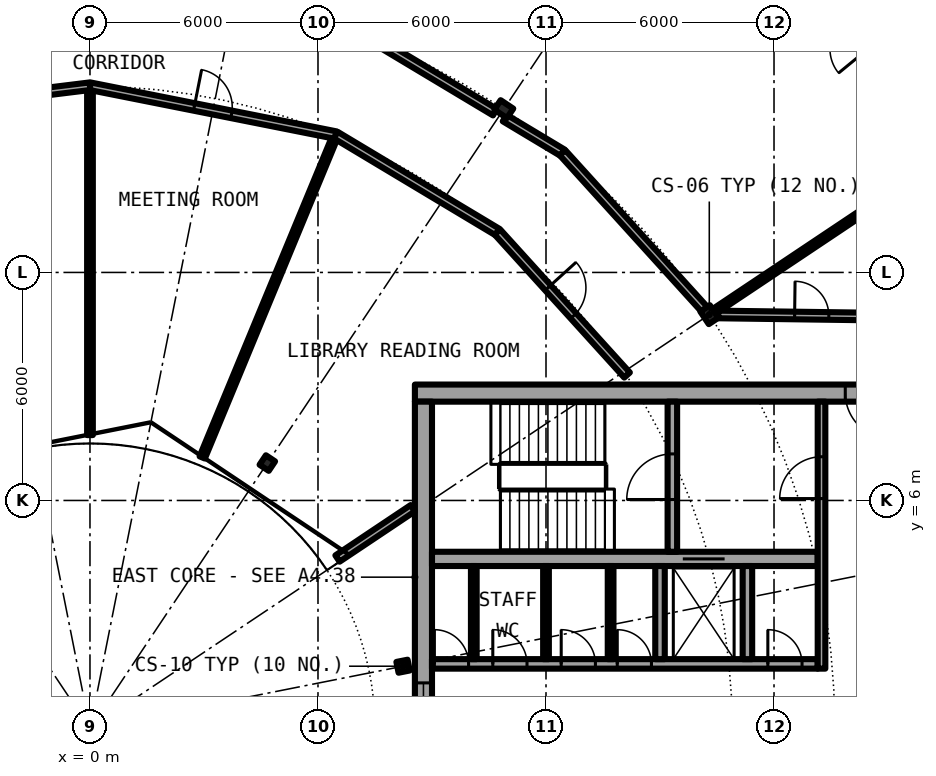
"""IFC4 building model, lengths in metres.
Left out: names, types, materials, properties, quantities, classifications, styles, units other than length and angle.
Written with IfcOpenShell. Run it as: python <this file> out.ifc"""

import sys

from ifc_helpers import new_model, si_unit, direction, frame, frame_2d, origin, origin_2d, place, context, subcontext, project, spatial, rectangle, i_section, extrude, element, fill, save


model = new_model("IFC4")
c1 = context("Model", 3, precision=1e-05, world=origin(), true_north=direction((0.0, 1.0)))
c2 = subcontext(c1, "Body", "Model", "MODEL_VIEW")
j1 = project(units=[si_unit("LENGTHUNIT", "METRE"), si_unit("PLANEANGLEUNIT", "RADIAN")], contexts=[c1])
p1 = place(None, origin())
s1 = spatial("IfcSite", under=j1, at=p1, CompositionType="ELEMENT")
p2 = place(p1, origin())
s2 = spatial("IfcBuilding", under=s1, at=p2, CompositionType="ELEMENT")
p3 = place(p2, frame((0.0, 0.0, 208.5)))
s3 = spatial("IfcBuildingStorey", under=s2, at=p3, CompositionType="ELEMENT", Elevation=208.5)
for number, where, z_axis, x_axis in (
    (1, (16.297, 10.889, 0.0), (0.0, 0.0, 1.0), (0.831, 0.556, 0.0)),
    (2, (10.889, 16.297, 0.0), (0.0, 0.0, 1.0), (0.556, 0.831, 0.0)),
):
    element("IfcColumn", number, at=place(p3, frame(where, z_axis=z_axis, x_axis=x_axis)), inside=s3, PredefinedType="COLUMN", context=c2, shape_type="SweptSolid", body=[
        extrude(i_section(OverallWidth=0.3, OverallDepth=0.4, WebThickness=0.013, FlangeThickness=0.024, FilletRadius=0.027, at=origin_2d()), origin(), (0.0, 0.0, 1.0), 4.2),
    ])
for number, where, z_axis, x_axis in (
    (3, (8.239, 1.639, 0.0), (0.0, 0.0, 1.0), (0.981, 0.195, 0.0)),
    (4, (4.667, 6.984, 0.0), (0.0, 0.0, 1.0), (0.556, 0.831, 0.0)),
):
    element("IfcColumn", number, at=place(p3, frame(where, z_axis=z_axis, x_axis=x_axis)), inside=s3, PredefinedType="COLUMN", context=c2, shape_type="SweptSolid", body=[
        extrude(i_section(OverallWidth=0.3, OverallDepth=0.29, WebThickness=0.009, FlangeThickness=0.014, FilletRadius=0.027, at=origin_2d()), origin(), (0.0, 0.0, 1.0), 4.2),
    ])
p4 = place(p3, frame((22.699, 15.167, 0.0), z_axis=(0.0, 0.0, 1.0), x_axis=(-0.634382322723, 0.773019449054, 0.0)))
e5 = element("IfcWall", 5, at=p4, inside=s3, PredefinedType="SOLIDWALL", context=c2, shape_type="SweptSolid", body=[
    extrude(rectangle(XDim=5.352, YDim=0.25, at=frame_2d((2.676, 0.0))), origin(), (0.0, 0.0, 1.0), 3.85),
])
p5 = place(p4, frame((0.841, 0.0, 0.0)))
e6 = element("IfcOpeningElement", 6, at=p5, cuts=e5, PredefinedType="OPENING", context=c2, shape_type="SweptSolid", body=[
    extrude(rectangle(XDim=1.0, YDim=2.2, at=frame_2d((0.5, 1.1))), frame((0.0, 0.135, 0.0), z_axis=(0.0, -1.0, 0.0), x_axis=(1.0, 0.0, 0.0)), (0.0, 0.0, 1.0), 0.27),
])
p6 = place(p4, frame((3.51, 0.0, 0.0)))
e7 = element("IfcOpeningElement", 7, at=p6, cuts=e5, PredefinedType="OPENING", context=c2, shape_type="SweptSolid", body=[
    extrude(rectangle(XDim=1.0, YDim=2.2, at=frame_2d((0.5, 1.1))), frame((0.0, 0.135, 0.0), z_axis=(0.0, -1.0, 0.0), x_axis=(1.0, 0.0, 0.0)), (0.0, 0.0, 1.0), 0.27),
])
p7 = place(p3, frame((22.05, 8.825, 0.0), z_axis=(0.0, 0.0, 1.0), x_axis=(-1.0, 0.0, 0.0)))
e8 = element("IfcWall", 8, at=p7, inside=s3, PredefinedType="SHEAR", context=c2, shape_type="SweptSolid", body=[
    extrude(rectangle(XDim=13.5, YDim=0.45, at=frame_2d((6.75, 0.0))), origin(), (0.0, 0.0, 1.0), 4.2),
])
p8 = place(p7, frame((0.975, 0.0, 0.0)))
e9 = element("IfcOpeningElement", 9, at=p8, cuts=e8, PredefinedType="OPENING", context=c2, shape_type="SweptSolid", body=[
    extrude(rectangle(XDim=1.2, YDim=2.3, at=frame_2d((0.6, 1.15))), frame((0.0, 0.235, 0.0), z_axis=(0.0, -1.0, 0.0), x_axis=(1.0, 0.0, 0.0)), (0.0, 0.0, 1.0), 0.47),
])
p9 = place(p3, frame((8.775, -8.6, 0.0), z_axis=(0.0, 0.0, 1.0), x_axis=(0.0, 1.0, 0.0)))
e10 = element("IfcWall", 10, at=p9, inside=s3, PredefinedType="SHEAR", context=c2, shape_type="SweptSolid", body=[
    extrude(rectangle(XDim=17.2, YDim=0.45, at=frame_2d((8.6, 0.0))), origin(), (0.0, 0.0, 1.0), 4.2),
])
p10 = place(p9, frame((7.4, 0.0, 0.1)))
e11 = element("IfcOpeningElement", 11, at=p10, cuts=e10, PredefinedType="OPENING", context=c2, shape_type="SweptSolid", body=[
    extrude(rectangle(XDim=2.4, YDim=2.2, at=frame_2d((1.2, 1.1))), frame((0.0, 0.235, 0.0), z_axis=(0.0, -1.0, 0.0), x_axis=(1.0, 0.0, 0.0)), (0.0, 0.0, 1.0), 0.47),
])
p11 = place(p3, frame((9.0, 1.7, 0.0), z_axis=(0.0, 0.0, 1.0), x_axis=(1.0, 0.0, 0.0)))
e12 = element("IfcWall", 12, at=p11, inside=s3, PredefinedType="SHEAR", context=c2, shape_type="SweptSolid", body=[
    extrude(rectangle(XDim=10.15, YDim=0.25, at=frame_2d((5.075, 0.0))), origin(), (0.0, 0.0, 1.0), 4.2),
])
p12 = place(p11, frame((0.062, 0.0, 0.0)))
e13 = element("IfcOpeningElement", 13, at=p12, cuts=e12, PredefinedType="OPENING", context=c2, shape_type="SweptSolid", body=[
    extrude(rectangle(XDim=0.9, YDim=2.3, at=frame_2d((0.45, 1.15))), frame((0.0, 0.135, 0.0), z_axis=(0.0, -1.0, 0.0), x_axis=(1.0, 0.0, 0.0)), (0.0, 0.0, 1.0), 0.27),
])
p13 = place(p11, frame((1.6, 0.0, 0.0)))
e14 = element("IfcOpeningElement", 14, at=p13, cuts=e12, PredefinedType="OPENING", context=c2, shape_type="SweptSolid", body=[
    extrude(rectangle(XDim=0.9, YDim=2.3, at=frame_2d((0.45, 1.15))), frame((0.0, 0.135, 0.0), z_axis=(0.0, -1.0, 0.0), x_axis=(1.0, 0.0, 0.0)), (0.0, 0.0, 1.0), 0.27),
])
p14 = place(p11, frame((3.4, 0.0, 0.0)))
e15 = element("IfcOpeningElement", 15, at=p14, cuts=e12, PredefinedType="OPENING", context=c2, shape_type="SweptSolid", body=[
    extrude(rectangle(XDim=0.9, YDim=2.3, at=frame_2d((0.45, 1.15))), frame((0.0, 0.135, 0.0), z_axis=(0.0, -1.0, 0.0), x_axis=(1.0, 0.0, 0.0)), (0.0, 0.0, 1.0), 0.27),
])
p15 = place(p11, frame((4.875, 0.0, 0.0)))
e16 = element("IfcOpeningElement", 16, at=p15, cuts=e12, PredefinedType="OPENING", context=c2, shape_type="SweptSolid", body=[
    extrude(rectangle(XDim=0.9, YDim=2.3, at=frame_2d((0.45, 1.15))), frame((0.0, 0.135, 0.0), z_axis=(0.0, -1.0, 0.0), x_axis=(1.0, 0.0, 0.0)), (0.0, 0.0, 1.0), 0.27),
])
p16 = place(p11, frame((8.837, 0.0, 0.0)))
e17 = element("IfcOpeningElement", 17, at=p16, cuts=e12, PredefinedType="OPENING", context=c2, shape_type="SweptSolid", body=[
    extrude(rectangle(XDim=0.9, YDim=2.3, at=frame_2d((0.45, 1.15))), frame((0.0, 0.135, 0.0), z_axis=(0.0, -1.0, 0.0), x_axis=(1.0, 0.0, 0.0)), (0.0, 0.0, 1.0), 0.27),
])
p17 = place(p3, frame((9.0, 4.462, 0.0), z_axis=(0.0, 0.0, 1.0), x_axis=(1.0, 0.0, 0.0)))
e18 = element("IfcWall", 18, at=p17, inside=s3, PredefinedType="SHEAR", context=c2, shape_type="SweptSolid", body=[
    extrude(rectangle(XDim=10.15, YDim=0.375, at=frame_2d((5.075, 0.0))), origin(), (0.0, 0.0, 1.0), 4.2),
])
p18 = place(p17, frame((6.6, 0.0, 0.0)))
e19 = element("IfcOpeningElement", 19, at=p18, cuts=e18, PredefinedType="OPENING", context=c2, shape_type="SweptSolid", body=[
    extrude(rectangle(XDim=1.1, YDim=2.3, at=frame_2d((0.55, 1.15))), frame((0.0, 0.198, 0.0), z_axis=(0.0, -1.0, 0.0), x_axis=(1.0, 0.0, 0.0)), (0.0, 0.0, 1.0), 0.395),
])
p19 = place(p3, frame((15.325, 4.65, 0.0), z_axis=(0.0, 0.0, 1.0), x_axis=(0.0, 1.0, 0.0)))
e20 = element("IfcWall", 20, at=p19, inside=s3, PredefinedType="SHEAR", context=c2, shape_type="SweptSolid", body=[
    extrude(rectangle(XDim=3.95, YDim=0.25, at=frame_2d((1.975, 0.0))), origin(), (0.0, 0.0, 1.0), 4.2),
])
p20 = place(p19, frame((1.375, 0.0, 0.0)))
e21 = element("IfcOpeningElement", 21, at=p20, cuts=e20, PredefinedType="OPENING", context=c2, shape_type="SweptSolid", body=[
    extrude(rectangle(XDim=1.2, YDim=2.3, at=frame_2d((0.6, 1.15))), frame((0.0, 0.135, 0.0), z_axis=(0.0, -1.0, 0.0), x_axis=(1.0, 0.0, 0.0)), (0.0, 0.0, 1.0), 0.27),
])
for number, where, z_axis, x_axis in (
    (22, (15.0, 1.825, 0.0), (0.0, 0.0, 1.0), (0.0, 1.0, 0.0)),
    (23, (17.3, 1.825, 0.0), (0.0, 0.0, 1.0), (0.0, 1.0, 0.0)),
):
    element("IfcWall", number, at=place(p3, frame(where, z_axis=z_axis, x_axis=x_axis)), inside=s3, PredefinedType="SOLIDWALL", context=c2, shape_type="SweptSolid", body=[
        extrude(rectangle(XDim=2.45, YDim=0.25, at=frame_2d((1.225, 0.0))), origin(), (0.0, 0.0, 1.0), 3.85),
    ])
p21 = place(p3, frame((19.25, 1.575, 0.0), z_axis=(0.0, 0.0, 1.0), x_axis=(0.0, 1.0, 0.0)))
e24 = element("IfcWall", 24, at=p21, inside=s3, PredefinedType="SOLIDWALL", context=c2, shape_type="SweptSolid", body=[
    extrude(rectangle(XDim=7.025, YDim=0.2, at=frame_2d((3.513, 0.0))), origin(), (0.0, 0.0, 1.0), 3.85),
])
p22 = place(p21, frame((4.475, 0.0, 0.0)))
e25 = element("IfcOpeningElement", 25, at=p22, cuts=e24, PredefinedType="OPENING", context=c2, shape_type="SweptSolid", body=[
    extrude(rectangle(XDim=1.1, YDim=2.3, at=frame_2d((0.55, 1.15))), frame((0.0, 0.11, 0.0), z_axis=(0.0, -1.0, 0.0), x_axis=(1.0, 0.0, 0.0)), (0.0, 0.0, 1.0), 0.22),
])
for number, where, z_axis, x_axis in (
    (26, (10.1, 1.825, 0.0), (0.0, 0.0, 1.0), (0.0, 1.0, 0.0)),
    (27, (12.0, 1.825, 0.0), (0.0, 0.0, 1.0), (0.0, 1.0, 0.0)),
    (28, (13.7, 1.825, 0.0), (0.0, 0.0, 1.0), (0.0, 1.0, 0.0)),
):
    element("IfcWall", number, at=place(p3, frame(where, z_axis=z_axis, x_axis=x_axis)), inside=s3, PredefinedType="PARTITIONING", context=c2, shape_type="SweptSolid", body=[
        extrude(rectangle(XDim=2.45, YDim=0.15, at=frame_2d((1.225, 0.0))), origin(), (0.0, 0.0, 1.0), 3.85),
    ])
p23 = place(p3, frame((0.0, 7.72, 0.0), z_axis=(0.0, 0.0, 1.0), x_axis=(0.0, 1.0, 0.0)))
e29 = element("IfcWall", 29, at=p23, inside=s3, PredefinedType="PARTITIONING", context=c2, shape_type="SweptSolid", body=[
    extrude(rectangle(XDim=9.18, YDim=0.15, at=frame_2d((4.59, 0.0))), origin(), (0.0, 0.0, 1.0), 3.85),
])
p24 = place(p3, frame((2.954, 7.132, 0.0), z_axis=(0.0, 0.0, 1.0), x_axis=(0.382646942224, 0.923894646378, 0.0)))
e30 = element("IfcWall", 30, at=p24, inside=s3, PredefinedType="PARTITIONING", context=c2, shape_type="SweptSolid", body=[
    extrude(rectangle(XDim=9.181, YDim=0.15, at=frame_2d((4.59, 0.0))), origin(), (0.0, 0.0, 1.0), 3.85),
])
p25 = place(p3, frame((16.463, 11.0, 0.0), z_axis=(0.0, 0.0, 1.0), x_axis=(0.831433566583, 0.555624175463, 0.0)))
e31 = element("IfcWall", 31, at=p25, inside=s3, PredefinedType="PARTITIONING", context=c2, shape_type="SweptSolid", body=[
    extrude(rectangle(XDim=7.375, YDim=0.15, at=frame_2d((3.688, 0.0))), origin(), (0.0, 0.0, 1.0), 3.85),
])
p26 = place(p3, frame((6.513, 4.472, 0.0), z_axis=(0.0, 0.0, 1.0), x_axis=(0.831403409976, 0.555669299026, 0.0)))
e32 = element("IfcWall", 32, at=p26, inside=s3, PredefinedType="PARTITIONING", context=c2, shape_type="SweptSolid", body=[
    extrude(rectangle(XDim=2.383, YDim=0.2, at=frame_2d((1.191, 0.0))), origin(), (0.0, 0.0, 1.0), 3.85),
])
p27 = place(p3, frame((16.534, 10.894, 0.0), z_axis=(0.0, 0.0, 1.0), x_axis=(0.999909707888, -0.013437859594, 0.0)))
e33 = element("IfcWall", 33, at=p27, inside=s3, PredefinedType="PARTITIONING", context=c2, shape_type="SweptSolid", body=[
    extrude(rectangle(XDim=5.142, YDim=0.2, at=frame_2d((2.571, 0.0))), origin(), (0.0, 0.0, 1.0), 3.85),
])
p28 = place(p27, frame((2.008, 0.0, 0.0)))
e34 = element("IfcOpeningElement", 34, at=p28, cuts=e33, PredefinedType="OPENING", context=c2, shape_type="SweptSolid", body=[
    extrude(rectangle(XDim=0.9, YDim=2.3, at=frame_2d((0.45, 1.15))), frame((0.0, 0.11, 0.0), z_axis=(0.0, -1.0, 0.0), x_axis=(1.0, 0.0, 0.0)), (0.0, 0.0, 1.0), 0.22),
])
p29 = place(p3, frame((0.0, 16.9, 0.0), z_axis=(0.0, 0.0, 1.0), x_axis=(0.980799374359, -0.195019453537, 0.0)))
e35 = element("IfcWall", 35, at=p29, inside=s3, PredefinedType="PARTITIONING", context=c2, shape_type="SweptSolid", body=[
    extrude(rectangle(XDim=6.594, YDim=0.2, at=frame_2d((3.297, 0.0))), origin(), (0.0, 0.0, 1.0), 3.85),
])
p30 = place(p29, frame((2.797, 0.0, 0.0)))
e36 = element("IfcOpeningElement", 36, at=p30, cuts=e35, PredefinedType="OPENING", context=c2, shape_type="SweptSolid", body=[
    extrude(rectangle(XDim=1.0, YDim=2.3, at=frame_2d((0.5, 1.15))), frame((0.0, 0.11, 0.0), z_axis=(0.0, -1.0, 0.0), x_axis=(1.0, 0.0, 0.0)), (0.0, 0.0, 1.0), 0.22),
])
p31 = place(p3, frame((6.467, 15.614, 0.0), z_axis=(0.0, 0.0, 1.0), x_axis=(0.857696997328, -0.514155483074, 0.0)))
e37 = element("IfcWall", 37, at=p31, inside=s3, PredefinedType="PARTITIONING", context=c2, shape_type="SweptSolid", body=[
    extrude(rectangle(XDim=4.96, YDim=0.2, at=frame_2d((2.48, 0.0))), origin(), (0.0, 0.0, 1.0), 3.85),
])
p32 = place(p3, frame((10.721, 13.064, 0.0), z_axis=(0.0, 0.0, 1.0), x_axis=(0.671634030197, -0.740883074095, 0.0)))
e38 = element("IfcWall", 38, at=p32, inside=s3, PredefinedType="PARTITIONING", context=c2, shape_type="SweptSolid", body=[
    extrude(rectangle(XDim=5.08, YDim=0.2, at=frame_2d((2.54, 0.0))), origin(), (0.0, 0.0, 1.0), 3.85),
])
p33 = place(p32, frame((1.98, 0.0, 0.0)))
e39 = element("IfcOpeningElement", 39, at=p33, cuts=e38, PredefinedType="OPENING", context=c2, shape_type="SweptSolid", body=[
    extrude(rectangle(XDim=1.0, YDim=2.3, at=frame_2d((0.5, 1.15))), frame((0.0, 0.11, 0.0), z_axis=(0.0, -1.0, 0.0), x_axis=(1.0, 0.0, 0.0)), (0.0, 0.0, 1.0), 0.22),
])
p34 = place(p3, frame((-4.106, 16.394, 0.0), z_axis=(0.0, 0.0, 1.0), x_axis=(0.992496033272, 0.122276833211, 0.0)))
e40 = element("IfcWall", 40, at=p34, inside=s3, PredefinedType="PARTITIONING", context=c2, shape_type="SweptSolid", body=[
    extrude(rectangle(XDim=4.137, YDim=0.2, at=frame_2d((2.068, 0.0))), origin(), (0.0, 0.0, 1.0), 3.85),
])
p35 = place(p3, frame((7.501, 18.108, 0.0), z_axis=(0.0, 0.0, 1.0), x_axis=(0.857750505244, -0.514066212421, 0.0)))
e41 = element("IfcWall", 41, at=p35, inside=s3, PredefinedType="PARTITIONING", context=c2, shape_type="SweptSolid", body=[
    extrude(rectangle(XDim=3.678, YDim=0.2, at=frame_2d((1.839, 0.0))), origin(), (0.0, 0.0, 1.0), 3.6),
])
p36 = place(p3, frame((10.913, 16.063, 0.0), z_axis=(0.0, 0.0, 1.0), x_axis=(0.857614365469, -0.514293301668, 0.0)))
e42 = element("IfcWall", 42, at=p36, inside=s3, PredefinedType="PARTITIONING", context=c2, shape_type="SweptSolid", body=[
    extrude(rectangle(XDim=1.773, YDim=0.2, at=frame_2d((0.887, 0.0))), origin(), (0.0, 0.0, 1.0), 3.6),
])
p37 = place(p3, frame((12.434, 15.151, 0.0), z_axis=(0.0, 0.0, 1.0), x_axis=(0.671619657805, -0.740896102871, 0.0)))
e43 = element("IfcWall", 43, at=p37, inside=s3, PredefinedType="PARTITIONING", context=c2, shape_type="SweptSolid", body=[
    extrude(rectangle(XDim=5.6, YDim=0.2, at=frame_2d((2.8, 0.0))), origin(), (0.0, 0.0, 1.0), 3.6),
])
p38 = place(p18, origin())
e44 = element("IfcDoor", 44, at=p38, inside=s3, OperationType="DOUBLE_DOOR_SLIDING", PredefinedType="DOOR", context=c2, shape_type="SweptSolid", body=[
    extrude(rectangle(XDim=1.1, YDim=2.3, at=frame_2d((0.55, 1.15))), frame((0.0, 0.025, 0.0), z_axis=(0.0, -1.0, 0.0), x_axis=(1.0, 0.0, 0.0)), (0.0, 0.0, 1.0), 0.05),
])
fill(e19, e44)
p39 = place(p12, origin())
e45 = element("IfcDoor", 45, at=p39, inside=s3, OperationType="SINGLE_SWING_RIGHT", PredefinedType="DOOR", context=c2, shape_type="SweptSolid", body=[
    extrude(rectangle(XDim=0.9, YDim=2.3, at=frame_2d((0.45, 1.15))), frame((0.0, 0.025, 0.0), z_axis=(0.0, -1.0, 0.0), x_axis=(1.0, 0.0, 0.0)), (0.0, 0.0, 1.0), 0.05),
])
fill(e13, e45)
p40 = place(p13, origin())
e46 = element("IfcDoor", 46, at=p40, inside=s3, OperationType="SINGLE_SWING_RIGHT", PredefinedType="DOOR", context=c2, shape_type="SweptSolid", body=[
    extrude(rectangle(XDim=0.9, YDim=2.3, at=frame_2d((0.45, 1.15))), frame((0.0, 0.025, 0.0), z_axis=(0.0, -1.0, 0.0), x_axis=(1.0, 0.0, 0.0)), (0.0, 0.0, 1.0), 0.05),
])
fill(e14, e46)
p41 = place(p14, origin())
e47 = element("IfcDoor", 47, at=p41, inside=s3, OperationType="SINGLE_SWING_RIGHT", PredefinedType="DOOR", context=c2, shape_type="SweptSolid", body=[
    extrude(rectangle(XDim=0.9, YDim=2.3, at=frame_2d((0.45, 1.15))), frame((0.0, 0.025, 0.0), z_axis=(0.0, -1.0, 0.0), x_axis=(1.0, 0.0, 0.0)), (0.0, 0.0, 1.0), 0.05),
])
fill(e15, e47)
p42 = place(p15, origin())
e48 = element("IfcDoor", 48, at=p42, inside=s3, OperationType="SINGLE_SWING_LEFT", PredefinedType="DOOR", context=c2, shape_type="SweptSolid", body=[
    extrude(rectangle(XDim=0.9, YDim=2.3, at=frame_2d((0.45, 1.15))), frame((0.0, 0.025, 0.0), z_axis=(0.0, -1.0, 0.0), x_axis=(1.0, 0.0, 0.0)), (0.0, 0.0, 1.0), 0.05),
])
fill(e16, e48)
p43 = place(p16, origin())
e49 = element("IfcDoor", 49, at=p43, inside=s3, OperationType="SINGLE_SWING_LEFT", PredefinedType="DOOR", context=c2, shape_type="SweptSolid", body=[
    extrude(rectangle(XDim=0.9, YDim=2.3, at=frame_2d((0.45, 1.15))), frame((0.0, 0.025, 0.0), z_axis=(0.0, -1.0, 0.0), x_axis=(1.0, 0.0, 0.0)), (0.0, 0.0, 1.0), 0.05),
])
fill(e17, e49)
p44 = place(p20, origin())
e50 = element("IfcDoor", 50, at=p44, inside=s3, OperationType="SINGLE_SWING_LEFT", PredefinedType="DOOR", context=c2, shape_type="SweptSolid", body=[
    extrude(rectangle(XDim=1.2, YDim=2.3, at=frame_2d((0.6, 1.15))), frame((0.0, 0.025, 0.0), z_axis=(0.0, -1.0, 0.0), x_axis=(1.0, 0.0, 0.0)), (0.0, 0.0, 1.0), 0.05),
])
fill(e21, e50)
p45 = place(p22, origin())
e51 = element("IfcDoor", 51, at=p45, inside=s3, OperationType="SINGLE_SWING_LEFT", PredefinedType="DOOR", context=c2, shape_type="SweptSolid", body=[
    extrude(rectangle(XDim=1.1, YDim=2.3, at=frame_2d((0.55, 1.15))), frame((0.0, 0.025, 0.0), z_axis=(0.0, -1.0, 0.0), x_axis=(1.0, 0.0, 0.0)), (0.0, 0.0, 1.0), 0.05),
])
fill(e25, e51)
p46 = place(p8, origin())
e52 = element("IfcDoor", 52, at=p46, inside=s3, OperationType="SINGLE_SWING_RIGHT", PredefinedType="DOOR", context=c2, shape_type="SweptSolid", body=[
    extrude(rectangle(XDim=1.2, YDim=2.3, at=frame_2d((0.6, 1.15))), frame((0.0, 0.025, 0.0), z_axis=(0.0, -1.0, 0.0), x_axis=(1.0, 0.0, 0.0)), (0.0, 0.0, 1.0), 0.05),
])
fill(e9, e52)
p47 = place(p10, origin())
e53 = element("IfcWindow", 53, at=p47, inside=s3, PartitioningType="SINGLE_PANEL", PredefinedType="WINDOW", context=c2, shape_type="SweptSolid", body=[
    extrude(rectangle(XDim=2.4, YDim=2.2, at=frame_2d((1.2, 1.1))), frame((0.0, 0.03, 0.0), z_axis=(0.0, -1.0, 0.0), x_axis=(1.0, 0.0, 0.0)), (0.0, 0.0, 1.0), 0.06),
])
fill(e11, e53)
p48 = place(p33, origin())
e54 = element("IfcDoor", 54, at=p48, inside=s3, OperationType="SINGLE_SWING_RIGHT", PredefinedType="DOOR", context=c2, shape_type="SweptSolid", body=[
    extrude(rectangle(XDim=1.0, YDim=2.3, at=frame_2d((0.5, 1.15))), frame((0.0, 0.025, 0.0), z_axis=(0.0, -1.0, 0.0), x_axis=(1.0, 0.0, 0.0)), (0.0, 0.0, 1.0), 0.05),
])
fill(e39, e54)
p49 = place(p30, origin())
e55 = element("IfcDoor", 55, at=p49, inside=s3, OperationType="SINGLE_SWING_LEFT", PredefinedType="DOOR", context=c2, shape_type="SweptSolid", body=[
    extrude(rectangle(XDim=1.0, YDim=2.3, at=frame_2d((0.5, 1.15))), frame((0.0, 0.025, 0.0), z_axis=(0.0, -1.0, 0.0), x_axis=(1.0, 0.0, 0.0)), (0.0, 0.0, 1.0), 0.05),
])
fill(e36, e55)
p50 = place(p28, origin())
e56 = element("IfcDoor", 56, at=p50, inside=s3, OperationType="SINGLE_SWING_LEFT", PredefinedType="DOOR", context=c2, shape_type="SweptSolid", body=[
    extrude(rectangle(XDim=0.9, YDim=2.3, at=frame_2d((0.45, 1.15))), frame((0.0, 0.025, 0.0), z_axis=(0.0, -1.0, 0.0), x_axis=(1.0, 0.0, 0.0)), (0.0, 0.0, 1.0), 0.05),
])
fill(e34, e56)
save(model, sys.argv[1])
